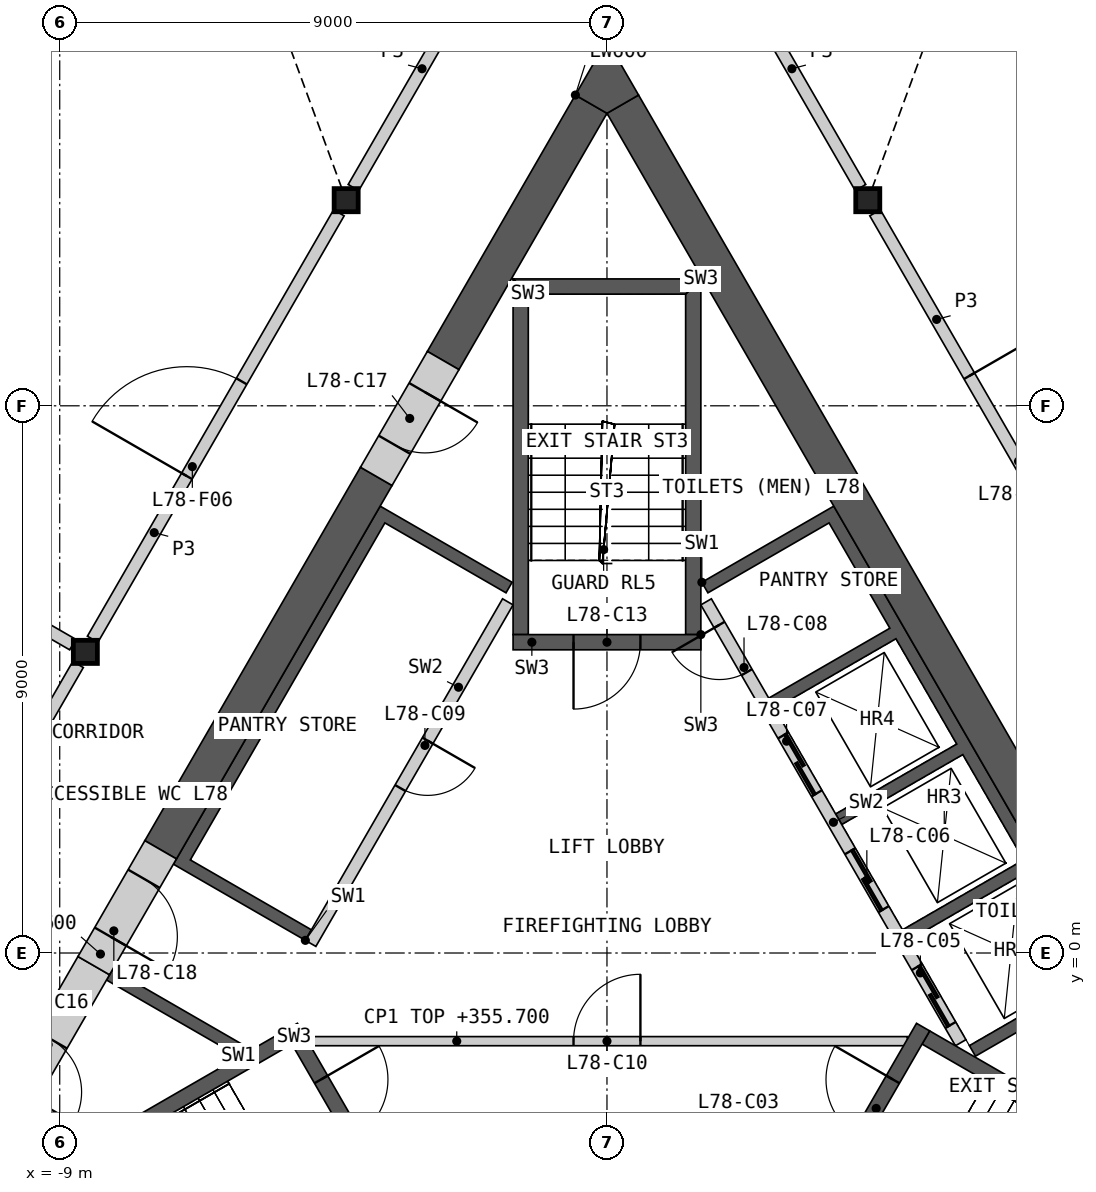
"""IFC4 building model, lengths in metres.
Left out: names, types, materials, properties, quantities, classifications, styles, units other than length and angle.
Written with IfcOpenShell. Run it as: python <this file> out.ifc"""

import sys

from ifc_helpers import new_model, si_unit, direction, frame, frame_2d, origin, origin_2d, place, context, subcontext, project, spatial, polyline, rectangle, i_section, outline, extrude, element, fill, save


model = new_model("IFC4")
c1 = context("Model", 3, precision=1e-05, world=origin(), true_north=direction((0.0, 1.0)))
c2 = subcontext(c1, "Body", "Model", "MODEL_VIEW")
j1 = project(units=[si_unit("LENGTHUNIT", "METRE"), si_unit("PLANEANGLEUNIT", "RADIAN")], contexts=[c1])
p1 = place(None, origin())
s1 = spatial("IfcSite", under=j1, at=p1, CompositionType="ELEMENT")
p2 = place(p1, origin())
s2 = spatial("IfcBuilding", under=s1, at=p2, CompositionType="ELEMENT")
p3 = place(p2, frame((0.0, 0.0, 346.0)))
s3 = spatial("IfcBuildingStorey", under=s2, at=p3, CompositionType="ELEMENT", Elevation=346.0)
for number, where, z_axis, x_axis in (
    (1, (-4.289, 12.382, 0.0), (0.0, 0.0, 1.0), (1.0, 0.0, 0.0)),
    (2, (-8.578, 4.953, 0.0), (0.0, 0.0, 1.0), (1.0, 0.0, 0.0)),
    (3, (4.289, 12.382, 0.0), (0.0, 0.0, 1.0), (1.0, 0.0, 0.0)),
):
    element("IfcColumn", number, at=place(p3, frame(where, z_axis=z_axis, x_axis=x_axis)), inside=s3, PredefinedType="COLUMN", context=c2, shape_type="SweptSolid", body=[
        extrude(i_section(OverallWidth=0.396, OverallDepth=0.381, WebThickness=0.019, FlangeThickness=0.03, at=origin_2d()), origin(), (0.0, 0.0, 1.0), 10.0),
    ])
p4 = place(p3, origin())
e4 = element("IfcWall", 4, at=p4, inside=s3, PredefinedType="SHEAR", context=c2, shape_type="SweptSolid", body=[
    extrude(outline(polyline([(1.561, 6.097), (3.731, 7.35), (8.231, -0.444), (6.061, -1.697), (5.96, -1.524), (7.952, -0.374), (6.952, 1.358), (4.96, 0.208), (4.861, 0.381), (6.852, 1.531), (5.852, 3.263), (3.861, 2.113), (3.76, 2.287), (5.752, 3.437), (4.752, 5.169), (2.76, 4.019), (2.66, 4.192), (4.652, 5.342), (3.652, 7.074), (1.66, 5.924), (1.561, 6.097)])), origin(), (0.0, 0.0, 1.0), 9.7),
])
p5 = place(p3, frame((5.817, -1.476, 0.0), z_axis=(0.0, 0.0, 1.0), x_axis=(-0.500002616675, 0.866023893041, 0.0)))
e5 = element("IfcWall", 5, at=p5, inside=s3, PredefinedType="SOLIDWALL", context=c2, shape_type="SweptSolid", body=[
    extrude(rectangle(XDim=8.373, YDim=0.2, at=frame_2d((4.187, 0.0))), origin(), (0.0, 0.0, 1.0), 9.7),
])
p6 = place(p5, frame((0.337, 0.0, 0.0)))
e6 = element("IfcOpeningElement", 6, at=p6, cuts=e5, PredefinedType="OPENING", context=c2, shape_type="SweptSolid", body=[
    extrude(rectangle(XDim=1.1, YDim=2.1, at=frame_2d((0.55, 1.05))), frame((0.0, 0.11, 0.0), z_axis=(0.0, -1.0, 0.0), x_axis=(1.0, 0.0, 0.0)), (0.0, 0.0, 1.0), 0.22),
])
p7 = place(p5, frame((2.537, 0.0, 0.0)))
e7 = element("IfcOpeningElement", 7, at=p7, cuts=e5, PredefinedType="OPENING", context=c2, shape_type="SweptSolid", body=[
    extrude(rectangle(XDim=1.1, YDim=2.1, at=frame_2d((0.55, 1.05))), frame((0.0, 0.11, 0.0), z_axis=(0.0, -1.0, 0.0), x_axis=(1.0, 0.0, 0.0)), (0.0, 0.0, 1.0), 0.22),
])
p8 = place(p5, frame((4.737, 0.0, 0.0)))
e8 = element("IfcOpeningElement", 8, at=p8, cuts=e5, PredefinedType="OPENING", context=c2, shape_type="SweptSolid", body=[
    extrude(rectangle(XDim=1.1, YDim=2.1, at=frame_2d((0.55, 1.05))), frame((0.0, 0.11, 0.0), z_axis=(0.0, -1.0, 0.0), x_axis=(1.0, 0.0, 0.0)), (0.0, 0.0, 1.0), 0.22),
])
p9 = place(p5, frame((7.037, 0.0, 0.0)))
e9 = element("IfcOpeningElement", 9, at=p9, cuts=e5, PredefinedType="OPENING", context=c2, shape_type="SweptSolid", body=[
    extrude(rectangle(XDim=0.9, YDim=2.1, at=frame_2d((0.45, 1.05))), frame((0.0, 0.11, 0.0), z_axis=(0.0, -1.0, 0.0), x_axis=(1.0, 0.0, 0.0)), (0.0, 0.0, 1.0), 0.22),
])
p10 = place(p3, origin())
e10 = element("IfcWall", 10, at=p10, inside=s3, PredefinedType="SHEAR", context=c2, shape_type="SweptSolid", body=[
    extrude(outline(polyline([(-6.061, -1.697), (-8.231, -0.444), (-8.131, -0.271), (-5.96, -1.524), (-6.061, -1.697)])), origin(), (0.0, 0.0, 1.0), 9.7),
])
p11 = place(p3, origin())
e11 = element("IfcWall", 11, at=p11, inside=s3, PredefinedType="SHEAR", context=c2, shape_type="SweptSolid", body=[
    extrude(outline(polyline([(-4.96, 0.208), (-7.131, 1.461), (-3.731, 7.35), (-1.561, 6.097), (-1.66, 5.924), (-3.652, 7.074), (-6.852, 1.531), (-4.861, 0.381), (-4.96, 0.208)])), origin(), (0.0, 0.0, 1.0), 9.7),
])
p12 = place(p3, frame((-1.631, 5.776, 0.0), z_axis=(0.0, 0.0, 1.0), x_axis=(-0.499992876559, -0.866029516466, 0.0)))
e12 = element("IfcWall", 12, at=p12, inside=s3, PredefinedType="SOLIDWALL", context=c2, shape_type="SweptSolid", body=[
    extrude(rectangle(XDim=6.486, YDim=0.2, at=frame_2d((3.243, 0.0))), origin(), (0.0, 0.0, 1.0), 9.7),
])
p13 = place(p12, frame((2.637, 0.0, 0.0)))
e13 = element("IfcOpeningElement", 13, at=p13, cuts=e12, PredefinedType="OPENING", context=c2, shape_type="SweptSolid", body=[
    extrude(rectangle(XDim=0.9, YDim=2.1, at=frame_2d((0.45, 1.05))), frame((0.0, 0.11, 0.0), z_axis=(0.0, -1.0, 0.0), x_axis=(1.0, 0.0, 0.0)), (0.0, 0.0, 1.0), 0.22),
])
p14 = place(p3, frame((-4.941, -1.45, 0.0), z_axis=(0.0, 0.0, 1.0), x_axis=(1.0, 0.0, 0.0)))
e14 = element("IfcWall", 14, at=p14, inside=s3, PredefinedType="PARTITIONING", context=c2, shape_type="SweptSolid", body=[
    extrude(rectangle(XDim=9.882, YDim=0.15, at=frame_2d((4.941, 0.0))), origin(), (0.0, 0.0, 1.0), 9.7),
])
p15 = place(p14, frame((4.391, 0.0, 0.0)))
e15 = element("IfcOpeningElement", 15, at=p15, cuts=e14, PredefinedType="OPENING", context=c2, shape_type="SweptSolid", body=[
    extrude(rectangle(XDim=1.1, YDim=2.1, at=frame_2d((0.55, 1.05))), frame((0.0, 0.085, 0.0), z_axis=(0.0, -1.0, 0.0), x_axis=(1.0, 0.0, 0.0)), (0.0, 0.0, 1.0), 0.17),
])
p16 = place(p3, origin())
e16 = element("IfcWall", 16, at=p16, inside=s3, PredefinedType="SHEAR", context=c2, shape_type="SweptSolid", body=[
    extrude(outline(polyline([(-5.307, -1.281), (-10.374, -4.206), (-10.032, -4.298), (-5.182, -1.498), (-5.307, -1.281)])), origin(), (0.0, 0.0, 1.0), 9.7),
])
p17 = place(p3, frame((-5.199, -1.219, 0.0), z_axis=(0.0, 0.0, 1.0), x_axis=(0.499982516597, -0.866035497597, 0.0)))
e17 = element("IfcWall", 17, at=p17, inside=s3, PredefinedType="SHEAR", context=c2, shape_type="SweptSolid", body=[
    extrude(rectangle(XDim=3.088, YDim=0.25, at=frame_2d((1.544, 0.0))), origin(), (0.0, 0.0, 1.0), 9.7),
])
p18 = place(p17, frame((0.994, 0.0, 0.0)))
e18 = element("IfcOpeningElement", 18, at=p18, cuts=e17, PredefinedType="OPENING", context=c2, shape_type="SweptSolid", body=[
    extrude(rectangle(XDim=1.1, YDim=2.1, at=frame_2d((0.55, 1.05))), frame((0.0, 0.135, 0.0), z_axis=(0.0, -1.0, 0.0), x_axis=(1.0, 0.0, 0.0)), (0.0, 0.0, 1.0), 0.27),
])
p19 = place(p3, origin())
e19 = element("IfcWall", 19, at=p19, inside=s3, PredefinedType="SHEAR", context=c2, shape_type="SweptSolid", body=[
    extrude(outline(polyline([(10.032, -4.298), (10.374, -4.206), (5.307, -1.281), (5.182, -1.498), (10.032, -4.298)])), origin(), (0.0, 0.0, 1.0), 9.7),
])
p20 = place(p3, frame((3.655, -3.893, 0.0), z_axis=(0.0, 0.0, 1.0), x_axis=(0.499982516597, 0.866035497597, 0.0)))
e20 = element("IfcWall", 20, at=p20, inside=s3, PredefinedType="SHEAR", context=c2, shape_type="SweptSolid", body=[
    extrude(rectangle(XDim=3.088, YDim=0.25, at=frame_2d((1.544, 0.0))), origin(), (0.0, 0.0, 1.0), 9.7),
])
p21 = place(p20, frame((0.994, 0.0, 0.0)))
e21 = element("IfcOpeningElement", 21, at=p21, cuts=e20, PredefinedType="OPENING", context=c2, shape_type="SweptSolid", body=[
    extrude(rectangle(XDim=1.1, YDim=2.1, at=frame_2d((0.55, 1.05))), frame((0.0, 0.135, 0.0), z_axis=(0.0, -1.0, 0.0), x_axis=(1.0, 0.0, 0.0)), (0.0, 0.0, 1.0), 0.27),
])
p22 = place(p3, origin())
e22 = element("IfcWall", 22, at=p22, inside=s3, PredefinedType="SHEAR", context=c2, shape_type="SweptSolid", body=[
    extrude(outline(polyline([(1.544, 5.237), (1.544, 11.087), (1.294, 10.837), (1.294, 5.237), (1.544, 5.237)])), origin(), (0.0, 0.0, 1.0), 9.7),
])
p23 = place(p3, origin())
e23 = element("IfcWall", 23, at=p23, inside=s3, PredefinedType="SHEAR", context=c2, shape_type="SweptSolid", body=[
    extrude(outline(polyline([(1.544, 11.087), (-1.544, 11.087), (-1.294, 10.837), (1.294, 10.837), (1.544, 11.087)])), origin(), (0.0, 0.0, 1.0), 9.7),
])
p24 = place(p3, origin())
e24 = element("IfcWall", 24, at=p24, inside=s3, PredefinedType="SHEAR", context=c2, shape_type="SweptSolid", body=[
    extrude(outline(polyline([(-1.294, 10.837), (-1.544, 11.087), (-1.544, 5.237), (-1.294, 5.237), (-1.294, 10.837)])), origin(), (0.0, 0.0, 1.0), 9.7),
])
p25 = place(p3, frame((1.544, 5.112, 0.0), z_axis=(0.0, 0.0, 1.0), x_axis=(-1.0, 0.0, 0.0)))
e25 = element("IfcWall", 25, at=p25, inside=s3, PredefinedType="SHEAR", context=c2, shape_type="SweptSolid", body=[
    extrude(rectangle(XDim=3.088, YDim=0.25, at=frame_2d((1.544, 0.0))), origin(), (0.0, 0.0, 1.0), 9.7),
])
p26 = place(p25, frame((0.994, 0.0, 0.0)))
e26 = element("IfcOpeningElement", 26, at=p26, cuts=e25, PredefinedType="OPENING", context=c2, shape_type="SweptSolid", body=[
    extrude(rectangle(XDim=1.1, YDim=2.1, at=frame_2d((0.55, 1.05))), frame((0.0, 0.135, 0.0), z_axis=(0.0, -1.0, 0.0), x_axis=(1.0, 0.0, 0.0)), (0.0, 0.0, 1.0), 0.27),
])
p27 = place(p3, frame((8.686, -0.634, 0.0), z_axis=(0.0, 0.0, 1.0), x_axis=(-0.500004601921, 0.866022746848, 0.0)))
e27 = element("IfcWall", 27, at=p27, inside=s3, PredefinedType="SHEAR", context=c2, shape_type="SweptSolid", body=[
    extrude(rectangle(XDim=16.853, YDim=0.6, at=frame_2d((8.426, 0.0))), origin(), (0.0, 0.0, 1.0), 9.7),
])
p28 = place(p3, frame((-3.794, 7.84, 0.0), z_axis=(0.0, 0.0, 1.0), x_axis=(-0.499974747889, -0.866039982607, 0.0)))
e28 = element("IfcWall", 28, at=p28, inside=s3, PredefinedType="SHEAR", context=c2, shape_type="SweptSolid", body=[
    extrude(rectangle(XDim=7.092, YDim=0.6, at=frame_2d((3.546, 0.0))), origin(), (0.0, 0.0, 1.0), 9.7),
])
p29 = place(p3, frame((-0.26, 13.961, 0.0), z_axis=(0.0, 0.0, 1.0), x_axis=(-0.50000604952, -0.866021911064, 0.0)))
e29 = element("IfcWall", 29, at=p29, inside=s3, PredefinedType="SHEAR", context=c2, shape_type="SweptSolid", body=[
    extrude(rectangle(XDim=4.869, YDim=0.6, at=frame_2d((2.434, 0.0))), origin(), (0.0, 0.0, 1.0), 9.7),
])
p30 = place(p3, origin())
e30 = element("IfcWall", 30, at=p30, inside=s3, PredefinedType="SHEAR", context=c2, shape_type="SweptSolid", body=[
    extrude(outline(polyline([(-0.52, 14.111), (0.0, 15.011), (0.52, 14.111), (0.0, 13.811), (-0.52, 14.111)])), origin(), (0.0, 0.0, 1.0), 9.7),
])
p31 = place(p3, frame((-8.44, -0.208, 0.0), z_axis=(0.0, 0.0, 1.0), x_axis=(-0.499997052475, -0.866027105532, 0.0)))
e31 = element("IfcWall", 31, at=p31, inside=s3, PredefinedType="SHEAR", context=c2, shape_type="SweptSolid", body=[
    extrude(rectangle(XDim=3.001, YDim=0.6, at=frame_2d((1.501, 0.0))), origin(), (0.0, 0.0, 1.0), 9.7),
])
p32 = place(p31, frame((1.4, 0.0, 0.0)))
e32 = element("IfcOpeningElement", 32, at=p32, cuts=e31, PredefinedType="OPENING", context=c2, shape_type="SweptSolid", body=[
    extrude(rectangle(XDim=1.0, YDim=2.1, at=frame_2d((0.5, 1.05))), frame((0.0, 0.31, 0.0), z_axis=(0.0, -1.0, 0.0), x_axis=(1.0, 0.0, 0.0)), (0.0, 0.0, 1.0), 0.62),
])
p33 = place(p3, frame((-2.694, 9.745, 0.0), z_axis=(0.0, 0.0, 1.0), x_axis=(-0.50002983664, -0.866008176907, 0.0)))
e33 = element("IfcWall", 33, at=p33, inside=s3, PredefinedType="SHEAR", context=c2, shape_type="SweptSolid", body=[
    extrude(rectangle(XDim=2.2, YDim=0.6, at=frame_2d((1.1, 0.0))), origin(), (0.0, 0.0, 1.0), 9.7),
])
p34 = place(p33, frame((0.6, 0.0, 0.0)))
e34 = element("IfcOpeningElement", 34, at=p34, cuts=e33, PredefinedType="OPENING", context=c2, shape_type="SweptSolid", body=[
    extrude(rectangle(XDim=1.0, YDim=2.1, at=frame_2d((0.5, 1.05))), frame((0.0, 0.31, 0.0), z_axis=(0.0, -1.0, 0.0), x_axis=(1.0, 0.0, 0.0)), (0.0, 0.0, 1.0), 0.62),
])
p35 = place(p3, frame((-7.34, 1.698, 0.0), z_axis=(0.0, 0.0, 1.0), x_axis=(-0.50002983664, -0.866008176907, 0.0)))
e35 = element("IfcWall", 35, at=p35, inside=s3, PredefinedType="SHEAR", context=c2, shape_type="SweptSolid", body=[
    extrude(rectangle(XDim=2.2, YDim=0.6, at=frame_2d((1.1, 0.0))), origin(), (0.0, 0.0, 1.0), 9.7),
])
p36 = place(p35, frame((0.55, 0.0, 0.0)))
e36 = element("IfcOpeningElement", 36, at=p36, cuts=e35, PredefinedType="OPENING", context=c2, shape_type="SweptSolid", body=[
    extrude(rectangle(XDim=1.1, YDim=2.1, at=frame_2d((0.55, 1.05))), frame((0.0, 0.31, 0.0), z_axis=(0.0, -1.0, 0.0), x_axis=(1.0, 0.0, 0.0)), (0.0, 0.0, 1.0), 0.62),
])
p37 = place(p3, frame((4.409, 12.174, 0.0), z_axis=(0.0, 0.0, 1.0), x_axis=(0.499984266882, -0.866034487114, 0.0)))
e37 = element("IfcWall", 37, at=p37, inside=s3, PredefinedType="PARTITIONING", context=c2, shape_type="SweptSolid", body=[
    extrude(rectangle(XDim=8.099, YDim=0.2, at=frame_2d((4.049, 0.0))), origin(), (0.0, 0.0, 1.0), 9.7),
])
p38 = place(p37, frame((3.099, 0.0, 0.0)))
e38 = element("IfcOpeningElement", 38, at=p38, cuts=e37, PredefinedType="OPENING", context=c2, shape_type="SweptSolid", body=[
    extrude(rectangle(XDim=1.8, YDim=2.1, at=frame_2d((0.9, 1.05))), frame((0.0, 0.11, 0.0), z_axis=(0.0, -1.0, 0.0), x_axis=(1.0, 0.0, 0.0)), (0.0, 0.0, 1.0), 0.22),
])
p39 = place(p3, frame((-8.458, 5.16, 0.0), z_axis=(0.0, 0.0, 1.0), x_axis=(0.499984266882, 0.866034487114, 0.0)))
e39 = element("IfcWall", 39, at=p39, inside=s3, PredefinedType="PARTITIONING", context=c2, shape_type="SweptSolid", body=[
    extrude(rectangle(XDim=8.099, YDim=0.2, at=frame_2d((4.049, 0.0))), origin(), (0.0, 0.0, 1.0), 9.7),
])
p40 = place(p39, frame((3.099, 0.0, 0.0)))
e40 = element("IfcOpeningElement", 40, at=p40, cuts=e39, PredefinedType="OPENING", context=c2, shape_type="SweptSolid", body=[
    extrude(rectangle(XDim=1.8, YDim=2.1, at=frame_2d((0.9, 1.05))), frame((0.0, 0.11, 0.0), z_axis=(0.0, -1.0, 0.0), x_axis=(1.0, 0.0, 0.0)), (0.0, 0.0, 1.0), 0.22),
])
p41 = place(p3, frame((-12.748, -2.269, 0.0), z_axis=(0.0, 0.0, 1.0), x_axis=(0.499984266882, 0.866034487114, 0.0)))
e41 = element("IfcWall", 41, at=p41, inside=s3, PredefinedType="PARTITIONING", context=c2, shape_type="SweptSolid", body=[
    extrude(rectangle(XDim=8.099, YDim=0.2, at=frame_2d((4.049, 0.0))), origin(), (0.0, 0.0, 1.0), 9.7),
])
p42 = place(p41, frame((3.2, 0.0, 0.0)))
e42 = element("IfcOpeningElement", 42, at=p42, cuts=e41, PredefinedType="OPENING", context=c2, shape_type="SweptSolid", body=[
    extrude(rectangle(XDim=1.8, YDim=2.1, at=frame_2d((0.9, 1.05))), frame((0.0, 0.11, 0.0), z_axis=(0.0, -1.0, 0.0), x_axis=(1.0, 0.0, 0.0)), (0.0, 0.0, 1.0), 0.22),
])
for number, where, z_axis, x_axis in (
    (43, (-4.169, 12.59, 0.0), (0.0, 0.0, 1.0), (0.5, 0.866, 0.0)),
    (44, (1.913, 16.498, 0.0), (0.0, 0.0, 1.0), (0.5, -0.866, 0.0)),
):
    element("IfcWall", number, at=place(p3, frame(where, z_axis=z_axis, x_axis=x_axis)), inside=s3, PredefinedType="PARTITIONING", context=c2, shape_type="SweptSolid", body=[
        extrude(rectangle(XDim=4.513, YDim=0.2, at=frame_2d((2.256, 0.0))), origin(), (0.0, 0.0, 1.0), 9.7),
    ])
p43 = place(p3, frame((-19.615, 11.325, 0.0), z_axis=(0.0, 0.0, 1.0), x_axis=(0.86602139559, -0.500006942333, 0.0)))
e45 = element("IfcWall", 45, at=p43, inside=s3, PredefinedType="PARTITIONING", context=c2, shape_type="SweptSolid", body=[
    extrude(rectangle(XDim=12.505, YDim=0.2, at=frame_2d((6.252, 0.0))), origin(), (0.0, 0.0, 1.0), 8.93),
])
p44 = place(p6, origin())
e46 = element("IfcDoor", 46, at=p44, inside=s3, OperationType="SLIDING_TO_LEFT", PredefinedType="DOOR", context=c2, shape_type="SweptSolid", body=[
    extrude(rectangle(XDim=1.1, YDim=2.1, at=frame_2d((0.55, 1.05))), frame((0.0, 0.025, 0.0), z_axis=(0.0, -1.0, 0.0), x_axis=(1.0, 0.0, 0.0)), (0.0, 0.0, 1.0), 0.05),
])
fill(e6, e46)
p45 = place(p7, origin())
e47 = element("IfcDoor", 47, at=p45, inside=s3, OperationType="SLIDING_TO_LEFT", PredefinedType="DOOR", context=c2, shape_type="SweptSolid", body=[
    extrude(rectangle(XDim=1.1, YDim=2.1, at=frame_2d((0.55, 1.05))), frame((0.0, 0.025, 0.0), z_axis=(0.0, -1.0, 0.0), x_axis=(1.0, 0.0, 0.0)), (0.0, 0.0, 1.0), 0.05),
])
fill(e7, e47)
p46 = place(p8, origin())
e48 = element("IfcDoor", 48, at=p46, inside=s3, OperationType="SLIDING_TO_LEFT", PredefinedType="DOOR", context=c2, shape_type="SweptSolid", body=[
    extrude(rectangle(XDim=1.1, YDim=2.1, at=frame_2d((0.55, 1.05))), frame((0.0, 0.025, 0.0), z_axis=(0.0, -1.0, 0.0), x_axis=(1.0, 0.0, 0.0)), (0.0, 0.0, 1.0), 0.05),
])
fill(e8, e48)
p47 = place(p9, origin())
e49 = element("IfcDoor", 49, at=p47, inside=s3, OperationType="SINGLE_SWING_RIGHT", PredefinedType="DOOR", context=c2, shape_type="SweptSolid", body=[
    extrude(rectangle(XDim=0.9, YDim=2.1, at=frame_2d((0.45, 1.05))), frame((0.0, 0.025, 0.0), z_axis=(0.0, -1.0, 0.0), x_axis=(1.0, 0.0, 0.0)), (0.0, 0.0, 1.0), 0.05),
])
fill(e9, e49)
p48 = place(p13, origin())
e50 = element("IfcDoor", 50, at=p48, inside=s3, OperationType="SINGLE_SWING_LEFT", PredefinedType="DOOR", context=c2, shape_type="SweptSolid", body=[
    extrude(rectangle(XDim=0.9, YDim=2.1, at=frame_2d((0.45, 1.05))), frame((0.0, 0.025, 0.0), z_axis=(0.0, -1.0, 0.0), x_axis=(1.0, 0.0, 0.0)), (0.0, 0.0, 1.0), 0.05),
])
fill(e13, e50)
p49 = place(p15, origin())
e51 = element("IfcDoor", 51, at=p49, inside=s3, OperationType="SINGLE_SWING_RIGHT", PredefinedType="DOOR", context=c2, shape_type="SweptSolid", body=[
    extrude(rectangle(XDim=1.1, YDim=2.1, at=frame_2d((0.55, 1.05))), frame((0.0, 0.025, 0.0), z_axis=(0.0, -1.0, 0.0), x_axis=(1.0, 0.0, 0.0)), (0.0, 0.0, 1.0), 0.05),
])
fill(e15, e51)
p50 = place(p18, origin())
e52 = element("IfcDoor", 52, at=p50, inside=s3, OperationType="SINGLE_SWING_LEFT", PredefinedType="DOOR", context=c2, shape_type="SweptSolid", body=[
    extrude(rectangle(XDim=1.1, YDim=2.1, at=frame_2d((0.55, 1.05))), frame((0.0, 0.025, 0.0), z_axis=(0.0, -1.0, 0.0), x_axis=(1.0, 0.0, 0.0)), (0.0, 0.0, 1.0), 0.05),
])
fill(e18, e52)
p51 = place(p21, origin())
e53 = element("IfcDoor", 53, at=p51, inside=s3, OperationType="SINGLE_SWING_RIGHT", PredefinedType="DOOR", context=c2, shape_type="SweptSolid", body=[
    extrude(rectangle(XDim=1.1, YDim=2.1, at=frame_2d((0.55, 1.05))), frame((0.0, 0.025, 0.0), z_axis=(0.0, -1.0, 0.0), x_axis=(1.0, 0.0, 0.0)), (0.0, 0.0, 1.0), 0.05),
])
fill(e21, e53)
p52 = place(p26, origin())
e54 = element("IfcDoor", 54, at=p52, inside=s3, OperationType="SINGLE_SWING_RIGHT", PredefinedType="DOOR", context=c2, shape_type="SweptSolid", body=[
    extrude(rectangle(XDim=1.1, YDim=2.1, at=frame_2d((0.55, 1.05))), frame((0.0, 0.025, 0.0), z_axis=(0.0, -1.0, 0.0), x_axis=(1.0, 0.0, 0.0)), (0.0, 0.0, 1.0), 0.05),
])
fill(e26, e54)
p53 = place(p32, origin())
e55 = element("IfcDoor", 55, at=p53, inside=s3, OperationType="SINGLE_SWING_RIGHT", PredefinedType="DOOR", context=c2, shape_type="SweptSolid", body=[
    extrude(rectangle(XDim=1.0, YDim=2.1, at=frame_2d((0.5, 1.05))), frame((0.0, 0.055, 0.0), z_axis=(0.0, -1.0, 0.0), x_axis=(1.0, 0.0, 0.0)), (0.0, 0.0, 1.0), 0.05),
])
fill(e32, e55)
p54 = place(p34, origin())
e56 = element("IfcDoor", 56, at=p54, inside=s3, OperationType="SINGLE_SWING_LEFT", PredefinedType="DOOR", context=c2, shape_type="SweptSolid", body=[
    extrude(rectangle(XDim=1.0, YDim=2.1, at=frame_2d((0.5, 1.05))), frame((0.0, 0.055, 0.0), z_axis=(0.0, -1.0, 0.0), x_axis=(1.0, 0.0, 0.0)), (0.0, 0.0, 1.0), 0.05),
])
fill(e34, e56)
p55 = place(p36, origin())
e57 = element("IfcDoor", 57, at=p55, inside=s3, OperationType="SINGLE_SWING_RIGHT", PredefinedType="DOOR", context=c2, shape_type="SweptSolid", body=[
    extrude(rectangle(XDim=1.1, YDim=2.1, at=frame_2d((0.55, 1.05))), frame((0.0, 0.055, 0.0), z_axis=(0.0, -1.0, 0.0), x_axis=(1.0, 0.0, 0.0)), (0.0, 0.0, 1.0), 0.05),
])
fill(e36, e57)
p56 = place(p38, origin())
e58 = element("IfcDoor", 58, at=p56, inside=s3, OperationType="DOUBLE_DOOR_SINGLE_SWING", PredefinedType="DOOR", context=c2, shape_type="SweptSolid", body=[
    extrude(rectangle(XDim=1.8, YDim=2.1, at=frame_2d((0.9, 1.05))), frame((0.0, 0.025, 0.0), z_axis=(0.0, -1.0, 0.0), x_axis=(1.0, 0.0, 0.0)), (0.0, 0.0, 1.0), 0.05),
])
fill(e38, e58)
p57 = place(p40, origin())
e59 = element("IfcDoor", 59, at=p57, inside=s3, OperationType="DOUBLE_DOOR_SINGLE_SWING", PredefinedType="DOOR", context=c2, shape_type="SweptSolid", body=[
    extrude(rectangle(XDim=1.8, YDim=2.1, at=frame_2d((0.9, 1.05))), frame((0.0, 0.025, 0.0), z_axis=(0.0, -1.0, 0.0), x_axis=(1.0, 0.0, 0.0)), (0.0, 0.0, 1.0), 0.05),
])
fill(e40, e59)
save(model, sys.argv[1])
